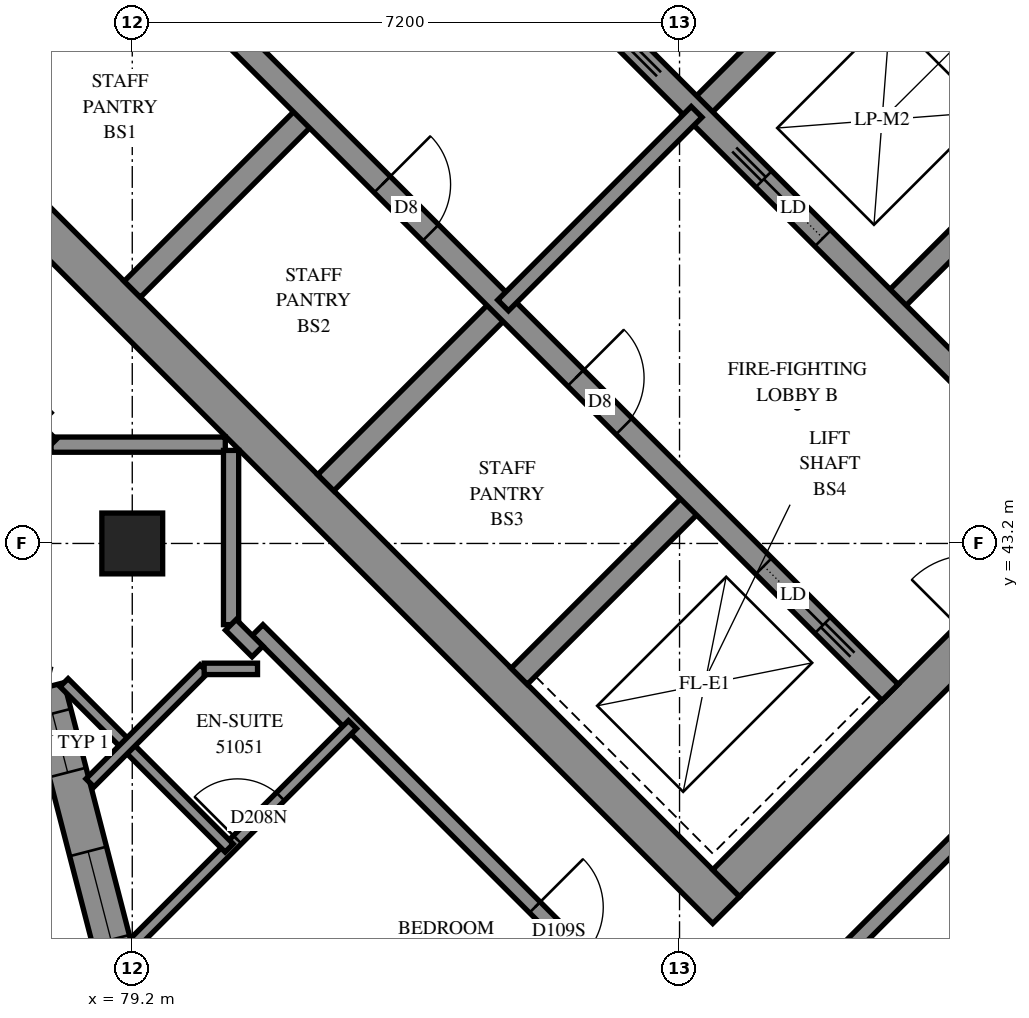
"""IFC4 building model, lengths in metres.
Left out: names, types, materials, properties, quantities, classifications, styles, units other than length and angle.
Written with IfcOpenShell. Run it as: python <this file> out.ifc"""

import sys

from ifc_helpers import new_model, si_unit, direction, frame, frame_2d, origin, origin_2d, place, context, subcontext, project, spatial, polyline, rectangle, outline, extrude, element, fill, save


model = new_model("IFC4")
c1 = context("Model", 3, precision=1e-05, world=origin(), true_north=direction((0.0, 1.0)))
c2 = subcontext(c1, "Body", "Model", "MODEL_VIEW")
j1 = project(units=[si_unit("LENGTHUNIT", "METRE"), si_unit("PLANEANGLEUNIT", "RADIAN")], contexts=[c1])
p1 = place(None, origin())
s1 = spatial("IfcSite", under=j1, at=p1, CompositionType="ELEMENT")
p2 = place(p1, origin())
s2 = spatial("IfcBuilding", under=s1, at=p2, CompositionType="ELEMENT")
p3 = place(p2, frame((0.0, 0.0, 189.6)))
s3 = spatial("IfcBuildingStorey", under=s2, at=p3, CompositionType="ELEMENT", Elevation=189.6)
p4 = place(p3, frame((79.2, 43.2, 0.0), z_axis=(0.0, 0.0, 1.0), x_axis=(1.0, 0.0, 0.0)))
e1 = element("IfcColumn", 1, at=p4, inside=s3, PredefinedType="COLUMN", context=c2, shape_type="SweptSolid", body=[
    extrude(rectangle(XDim=0.8, YDim=0.8, at=origin_2d()), origin(), (0.0, 0.0, 1.0), 3.1),
])
p5 = place(p3, frame((76.124, 49.267, -0.3), z_axis=(0.0, 0.0, 1.0), x_axis=(0.7071067812, -0.7071067812, 0.0)))
e2 = element("IfcWall", 2, at=p5, inside=s3, PredefinedType="SHEAR", context=c2, shape_type="SweptSolid", body=[
    extrude(rectangle(XDim=15.4, YDim=0.5, at=frame_2d((7.7, 0.0))), origin(), (0.0, 0.0, 1.0), 2.7),
])
p6 = place(p3, frame((86.66, 59.802, -0.3), z_axis=(0.0, 0.0, 1.0), x_axis=(0.7071067812, -0.7071067812, 0.0)))
e3 = element("IfcWall", 3, at=p6, inside=s3, PredefinedType="SHEAR", context=c2, shape_type="SweptSolid", body=[
    extrude(rectangle(XDim=15.4, YDim=0.5, at=frame_2d((7.7, 0.0))), origin(), (0.0, 0.0, 1.0), 2.7),
])
p7 = place(p6, frame((10.5, 0.0, 0.3)))
e4 = element("IfcOpeningElement", 4, at=p7, cuts=e3, PredefinedType="OPENING", context=c2, shape_type="SweptSolid", body=[
    extrude(rectangle(XDim=0.8, YDim=2.1, at=frame_2d((0.4, 1.05))), frame((0.0, 0.26, 0.0), z_axis=(0.0, -1.0, 0.0), x_axis=(1.0, 0.0, 0.0)), (0.0, 0.0, 1.0), 0.52),
])
p8 = place(p3, frame((76.478, 49.267, -0.3), z_axis=(0.0, 0.0, 1.0), x_axis=(0.7071067812, 0.7071067812, 0.0)))
e5 = element("IfcWall", 5, at=p8, inside=s3, PredefinedType="SHEAR", context=c2, shape_type="SweptSolid", body=[
    extrude(rectangle(XDim=14.4, YDim=0.5, at=frame_2d((7.2, 0.0))), origin(), (0.0, 0.0, 1.0), 2.7),
])
p9 = place(p8, frame((4.55, 0.0, 0.3)))
e6 = element("IfcOpeningElement", 6, at=p9, cuts=e5, PredefinedType="OPENING", context=c2, shape_type="SweptSolid", body=[
    extrude(rectangle(XDim=1.1, YDim=2.1, at=frame_2d((0.55, 1.05))), frame((0.0, 0.26, 0.0), z_axis=(0.0, -1.0, 0.0), x_axis=(1.0, 0.0, 0.0)), (0.0, 0.0, 1.0), 0.52),
])
p10 = place(p8, frame((11.35, 0.0, 0.3)))
e7 = element("IfcOpeningElement", 7, at=p10, cuts=e5, PredefinedType="OPENING", context=c2, shape_type="SweptSolid", body=[
    extrude(rectangle(XDim=1.1, YDim=2.1, at=frame_2d((0.55, 1.05))), frame((0.0, 0.26, 0.0), z_axis=(0.0, -1.0, 0.0), x_axis=(1.0, 0.0, 0.0)), (0.0, 0.0, 1.0), 0.52),
])
p11 = place(p3, frame((87.013, 38.731, -0.3), z_axis=(0.0, 0.0, 1.0), x_axis=(0.7071067812, 0.7071067812, 0.0)))
e8 = element("IfcWall", 8, at=p11, inside=s3, PredefinedType="SHEAR", context=c2, shape_type="SweptSolid", body=[
    extrude(rectangle(XDim=14.4, YDim=0.5, at=frame_2d((7.2, 0.0))), origin(), (0.0, 0.0, 1.0), 2.7),
])
p12 = place(p11, frame((4.55, 0.0, 0.3)))
e9 = element("IfcOpeningElement", 9, at=p12, cuts=e8, PredefinedType="OPENING", context=c2, shape_type="SweptSolid", body=[
    extrude(rectangle(XDim=1.1, YDim=2.1, at=frame_2d((0.55, 1.05))), frame((0.0, 0.26, 0.0), z_axis=(0.0, -1.0, 0.0), x_axis=(1.0, 0.0, 0.0)), (0.0, 0.0, 1.0), 0.52),
])
p13 = place(p11, frame((11.35, 0.0, 0.3)))
e10 = element("IfcOpeningElement", 10, at=p13, cuts=e8, PredefinedType="OPENING", context=c2, shape_type="SweptSolid", body=[
    extrude(rectangle(XDim=1.1, YDim=2.1, at=frame_2d((0.55, 1.05))), frame((0.0, 0.26, 0.0), z_axis=(0.0, -1.0, 0.0), x_axis=(1.0, 0.0, 0.0)), (0.0, 0.0, 1.0), 0.52),
])
p14 = place(p3, frame((79.2, 46.544, 0.0), z_axis=(0.0, 0.0, 1.0), x_axis=(0.7071219326, 0.7070916295, 0.0)))
e11 = element("IfcWall", 11, at=p14, inside=s3, PredefinedType="SOLIDWALL", context=c2, shape_type="SweptSolid", body=[
    extrude(rectangle(XDim=3.3, YDim=0.3, at=frame_2d((1.65, 0.0))), origin(), (0.0, 0.0, 1.0), 3.1),
])
p15 = place(p3, frame((81.746, 43.999, 0.0), z_axis=(0.0, 0.0, 1.0), x_axis=(0.7071067812, 0.7071067812, 0.0)))
e12 = element("IfcWall", 12, at=p15, inside=s3, PredefinedType="SOLIDWALL", context=c2, shape_type="SweptSolid", body=[
    extrude(rectangle(XDim=3.3, YDim=0.3, at=frame_2d((1.65, 0.0))), origin(), (0.0, 0.0, 1.0), 3.1),
])
p16 = place(p3, frame((86.625, 48.878, 0.0), z_axis=(0.0, 0.0, 1.0), x_axis=(0.7071067812, 0.7071067812, 0.0)))
e13 = element("IfcWall", 13, at=p16, inside=s3, PredefinedType="SOLIDWALL", context=c2, shape_type="SweptSolid", body=[
    extrude(rectangle(XDim=3.3, YDim=0.3, at=frame_2d((1.65, 0.0))), origin(), (0.0, 0.0, 1.0), 3.1),
])
p17 = place(p3, frame((84.291, 41.453, 0.0), z_axis=(0.0, 0.0, 1.0), x_axis=(0.7071067812, 0.7071067812, 0.0)))
e14 = element("IfcWall", 14, at=p17, inside=s3, PredefinedType="SOLIDWALL", context=c2, shape_type="SweptSolid", body=[
    extrude(rectangle(XDim=3.3, YDim=0.3, at=frame_2d((1.65, 0.0))), origin(), (0.0, 0.0, 1.0), 3.1),
])
p18 = place(p3, frame((89.17, 46.332, 0.0), z_axis=(0.0, 0.0, 1.0), x_axis=(0.7071067812, 0.7071067812, 0.0)))
e15 = element("IfcWall", 15, at=p18, inside=s3, PredefinedType="SOLIDWALL", context=c2, shape_type="SweptSolid", body=[
    extrude(rectangle(XDim=3.3, YDim=0.3, at=frame_2d((1.65, 0.0))), origin(), (0.0, 0.0, 1.0), 3.1),
])
p19 = place(p3, frame((78.988, 51.423, 0.0), z_axis=(0.0, 0.0, 1.0), x_axis=(0.7071067812, -0.7071067812, 0.0)))
e16 = element("IfcWall", 16, at=p19, inside=s3, PredefinedType="SOLIDWALL", context=c2, shape_type="SweptSolid", body=[
    extrude(rectangle(XDim=14.4, YDim=0.3, at=frame_2d((7.2, 0.0))), origin(), (0.0, 0.0, 1.0), 3.1),
])
p20 = place(p19, frame((1.35, 0.0, 0.0)))
e17 = element("IfcOpeningElement", 17, at=p20, cuts=e16, PredefinedType="OPENING", context=c2, shape_type="SweptSolid", body=[
    extrude(rectangle(XDim=0.9, YDim=2.1, at=frame_2d((0.45, 1.05))), frame((0.0, 0.16, 0.0), z_axis=(0.0, -1.0, 0.0), x_axis=(1.0, 0.0, 0.0)), (0.0, 0.0, 1.0), 0.32),
])
p21 = place(p19, frame((4.95, 0.0, 0.0)))
e18 = element("IfcOpeningElement", 18, at=p21, cuts=e16, PredefinedType="OPENING", context=c2, shape_type="SweptSolid", body=[
    extrude(rectangle(XDim=0.9, YDim=2.1, at=frame_2d((0.45, 1.05))), frame((0.0, 0.16, 0.0), z_axis=(0.0, -1.0, 0.0), x_axis=(1.0, 0.0, 0.0)), (0.0, 0.0, 1.0), 0.32),
])
p22 = place(p19, frame((8.55, 0.0, 0.0)))
e19 = element("IfcOpeningElement", 19, at=p22, cuts=e16, PredefinedType="OPENING", context=c2, shape_type="SweptSolid", body=[
    extrude(rectangle(XDim=0.9, YDim=2.1, at=frame_2d((0.45, 1.05))), frame((0.0, 0.16, 0.0), z_axis=(0.0, -1.0, 0.0), x_axis=(1.0, 0.0, 0.0)), (0.0, 0.0, 1.0), 0.32),
])
p23 = place(p19, frame((12.05, 0.0, 0.0)))
e20 = element("IfcOpeningElement", 20, at=p23, cuts=e16, PredefinedType="OPENING", context=c2, shape_type="SweptSolid", body=[
    extrude(rectangle(XDim=1.1, YDim=2.1, at=frame_2d((0.55, 1.05))), frame((0.0, 0.16, 0.0), z_axis=(0.0, -1.0, 0.0), x_axis=(1.0, 0.0, 0.0)), (0.0, 0.0, 1.0), 0.32),
])
p24 = place(p3, frame((81.534, 53.969, 0.0), z_axis=(0.0, 0.0, 1.0), x_axis=(0.707103309, -0.7071102534, 0.0)))
e21 = element("IfcWall", 21, at=p24, inside=s3, PredefinedType="SOLIDWALL", context=c2, shape_type="SweptSolid", body=[
    extrude(rectangle(XDim=14.4, YDim=0.3, at=frame_2d((7.2, 0.0))), origin(), (0.0, 0.0, 1.0), 3.1),
])
p25 = place(p24, frame((1.25, 0.0, 0.0)))
e22 = element("IfcOpeningElement", 22, at=p25, cuts=e21, PredefinedType="OPENING", context=c2, shape_type="SweptSolid", body=[
    extrude(rectangle(XDim=1.1, YDim=2.1, at=frame_2d((0.55, 1.05))), frame((0.0, 0.16, 0.0), z_axis=(0.0, -1.0, 0.0), x_axis=(1.0, 0.0, 0.0)), (0.0, 0.0, 1.0), 0.32),
])
p26 = place(p24, frame((4.85, 0.0, 0.0)))
e23 = element("IfcOpeningElement", 23, at=p26, cuts=e21, PredefinedType="OPENING", context=c2, shape_type="SweptSolid", body=[
    extrude(rectangle(XDim=1.1, YDim=2.1, at=frame_2d((0.55, 1.05))), frame((0.0, 0.16, 0.0), z_axis=(0.0, -1.0, 0.0), x_axis=(1.0, 0.0, 0.0)), (0.0, 0.0, 1.0), 0.32),
])
p27 = place(p24, frame((8.45, 0.0, 0.0)))
e24 = element("IfcOpeningElement", 24, at=p27, cuts=e21, PredefinedType="OPENING", context=c2, shape_type="SweptSolid", body=[
    extrude(rectangle(XDim=1.1, YDim=2.1, at=frame_2d((0.55, 1.05))), frame((0.0, 0.16, 0.0), z_axis=(0.0, -1.0, 0.0), x_axis=(1.0, 0.0, 0.0)), (0.0, 0.0, 1.0), 0.32),
])
p28 = place(p24, frame((12.05, 0.0, 0.0)))
e25 = element("IfcOpeningElement", 25, at=p28, cuts=e21, PredefinedType="OPENING", context=c2, shape_type="SweptSolid", body=[
    extrude(rectangle(XDim=1.1, YDim=2.1, at=frame_2d((0.55, 1.05))), frame((0.0, 0.16, 0.0), z_axis=(0.0, -1.0, 0.0), x_axis=(1.0, 0.0, 0.0)), (0.0, 0.0, 1.0), 0.32),
])
p29 = place(p3, frame((88.958, 51.211, 0.0), z_axis=(0.0, 0.0, 1.0), x_axis=(0.7070998367, -0.7071137256, 0.0)))
e26 = element("IfcWall", 26, at=p29, inside=s3, PredefinedType="SOLIDWALL", context=c2, shape_type="SweptSolid", body=[
    extrude(rectangle(XDim=7.2, YDim=0.3, at=frame_2d((3.6, 0.0))), origin(), (0.0, 0.0, 1.0), 3.1),
])
p30 = place(p3, frame((74.294, 42.253, 0.0), z_axis=(0.0, 0.0, 1.0), x_axis=(0.969855535, -0.243680613, 0.0)))
e27 = element("IfcWall", 27, at=p30, inside=s3, PredefinedType="SOLIDWALL", context=c2, shape_type="SweptSolid", body=[
    extrude(outline(polyline([(0.042, -0.25), (3.735, -0.25), (4.032, 0.25), (-0.042, 0.25), (0.042, -0.25)])), origin(), (0.0, 0.0, 1.0), 3.1),
])
p31 = place(p30, frame((1.915, 0.0, 0.45)))
e28 = element("IfcOpeningElement", 28, at=p31, cuts=e27, PredefinedType="OPENING", context=c2, shape_type="SweptSolid", body=[
    extrude(rectangle(XDim=1.2, YDim=2.5, at=frame_2d((0.6, 1.25))), frame((0.0, 0.26, 0.0), z_axis=(0.0, -1.0, 0.0), x_axis=(1.0, 0.0, 0.0)), (0.0, 0.0, 1.0), 0.52),
])
p32 = place(p3, frame((78.061, 41.306, 0.0), z_axis=(0.0, 0.0, 1.0), x_axis=(0.2504653843, -0.9681255555, 0.0)))
e29 = element("IfcWall", 29, at=p32, inside=s3, PredefinedType="SOLIDWALL", context=c2, shape_type="SweptSolid", body=[
    extrude(outline(polyline([(0.148, -0.25), (4.878, -0.25), (4.596, 0.25), (-0.148, 0.25), (0.148, -0.25)])), origin(), (0.0, 0.0, 1.0), 3.1),
])
p33 = place(p32, frame((2.229, 0.0, 0.45)))
e30 = element("IfcOpeningElement", 30, at=p33, cuts=e29, PredefinedType="OPENING", context=c2, shape_type="SweptSolid", body=[
    extrude(rectangle(XDim=1.2, YDim=2.5, at=frame_2d((0.6, 1.25))), frame((0.0, 0.26, 0.0), z_axis=(0.0, -1.0, 0.0), x_axis=(1.0, 0.0, 0.0)), (0.0, 0.0, 1.0), 0.52),
])
p34 = place(p32, frame((0.356, 0.0, 0.45)))
e31 = element("IfcOpeningElement", 31, at=p34, cuts=e29, PredefinedType="OPENING", context=c2, shape_type="SweptSolid", body=[
    extrude(rectangle(XDim=0.8, YDim=2.5, at=frame_2d((0.4, 1.25))), frame((0.0, 0.26, 0.0), z_axis=(0.0, -1.0, 0.0), x_axis=(1.0, 0.0, 0.0)), (0.0, 0.0, 1.0), 0.52),
])
p35 = place(p3, frame((84.079, 46.332, 0.0), z_axis=(0.0, 0.0, 1.0), x_axis=(0.7071067812, 0.7071067812, 0.0)))
e32 = element("IfcWall", 32, at=p35, inside=s3, PredefinedType="PARTITIONING", context=c2, shape_type="SweptSolid", body=[
    extrude(rectangle(XDim=3.6, YDim=0.2, at=frame_2d((1.8, 0.0))), origin(), (0.0, 0.0, 1.0), 3.1),
])
p36 = place(p3, frame((84.971, 31.945, 0.0), z_axis=(0.0, 0.0, 1.0), x_axis=(0.7072312442, 0.7069822963, 0.0)))
e33 = element("IfcWall", 33, at=p36, inside=s3, PredefinedType="PARTITIONING", context=c2, shape_type="SweptSolid", body=[
    extrude(rectangle(XDim=10.042, YDim=0.2, at=frame_2d((5.021, 0.0))), origin(), (0.0, 0.0, 1.0), 3.1),
])
p37 = place(p3, frame((86.835, 36.079, 0.0), z_axis=(0.0, 0.0, 1.0), x_axis=(0.7071067812, 0.7071067812, 0.0)))
e34 = element("IfcWall", 34, at=p37, inside=s3, PredefinedType="PARTITIONING", context=c2, shape_type="SweptSolid", body=[
    extrude(rectangle(XDim=8.2, YDim=0.2, at=frame_2d((4.1, 0.0))), origin(), (0.0, 0.0, 1.0), 3.1),
])
p38 = place(p3, frame((80.849, 42.061, 0.0), z_axis=(0.0, 0.0, 1.0), x_axis=(0.7071067812, -0.7071067812, 0.0)))
e35 = element("IfcWall", 35, at=p38, inside=s3, PredefinedType="PARTITIONING", context=c2, shape_type="SweptSolid", body=[
    extrude(rectangle(XDim=6.964, YDim=0.2, at=frame_2d((3.482, 0.0))), origin(), (0.0, 0.0, 1.0), 3.1),
])
p39 = place(p38, frame((5.159, 0.0, 0.0)))
e36 = element("IfcOpeningElement", 36, at=p39, cuts=e35, PredefinedType="OPENING", context=c2, shape_type="SweptSolid", body=[
    extrude(rectangle(XDim=0.9, YDim=2.1, at=frame_2d((0.45, 1.05))), frame((0.0, 0.11, 0.0), z_axis=(0.0, -1.0, 0.0), x_axis=(1.0, 0.0, 0.0)), (0.0, 0.0, 1.0), 0.22),
])
p40 = place(p3, frame((79.196, 37.915, 0.0), z_axis=(0.0, 0.0, 1.0), x_axis=(0.7070945944, 0.7071189677, 0.0)))
e37 = element("IfcWall", 37, at=p40, inside=s3, PredefinedType="PARTITIONING", context=c2, shape_type="SweptSolid", body=[
    extrude(rectangle(XDim=4.103, YDim=0.15, at=frame_2d((2.051, 0.0))), origin(), (0.0, 0.0, 1.0), 3.1),
])
p41 = place(p40, frame((1.962, 0.0, 0.0)))
e38 = element("IfcOpeningElement", 38, at=p41, cuts=e37, PredefinedType="OPENING", context=c2, shape_type="SweptSolid", body=[
    extrude(rectangle(XDim=0.8, YDim=2.1, at=frame_2d((0.4, 1.05))), frame((0.0, 0.085, 0.0), z_axis=(0.0, -1.0, 0.0), x_axis=(1.0, 0.0, 0.0)), (0.0, 0.0, 1.0), 0.17),
])
p42 = place(p3, frame((78.303, 41.369, 0.0), z_axis=(0.0, 0.0, 1.0), x_axis=(0.706602443, -0.7076107599, 0.0)))
e39 = element("IfcWall", 39, at=p42, inside=s3, PredefinedType="PARTITIONING", context=c2, shape_type="SweptSolid", body=[
    extrude(rectangle(XDim=3.074, YDim=0.15, at=frame_2d((1.537, 0.0))), origin(), (0.0, 0.0, 1.0), 3.1),
])
for number, where, z_axis, x_axis in (
    (40, (78.132, 44.5, 0.0), (0.0, 0.0, 1.0), (1.0, 0.0, 0.0)),
    (41, (80.5, 42.132, 0.0), (0.0, 0.0, 1.0), (0.0, 1.0, 0.0)),
):
    element("IfcWall", number, at=place(p3, frame(where, z_axis=z_axis, x_axis=x_axis)), inside=s3, PredefinedType="PARTITIONING", context=c2, shape_type="SweptSolid", body=[
        extrude(rectangle(XDim=2.292, YDim=0.2, at=frame_2d((1.146, 0.0))), origin(), (0.0, 0.0, 1.0), 3.1),
    ])
p43 = place(p3, frame((78.644, 40.05, 0.0), z_axis=(0.0, 0.0, 1.0), x_axis=(0.7070832255, 0.7071303361, 0.0)))
e42 = element("IfcWall", 42, at=p43, inside=s3, PredefinedType="PARTITIONING", context=c2, shape_type="SweptSolid", body=[
    extrude(rectangle(XDim=2.123, YDim=0.15, at=frame_2d((1.061, 0.0))), origin(), (0.0, 0.0, 1.0), 3.1),
])
p44 = place(p3, frame((80.146, 41.55, 0.0), z_axis=(0.0, 0.0, 1.0), x_axis=(1.0, 0.0, 0.0)))
e43 = element("IfcWall", 43, at=p44, inside=s3, PredefinedType="PARTITIONING", context=c2, shape_type="SweptSolid", body=[
    extrude(rectangle(XDim=0.702, YDim=0.15, at=frame_2d((0.351, 0.0))), origin(), (0.0, 0.0, 1.0), 3.1),
])
for number, where, z_axis, x_axis in (
    (44, (77.779, 44.847, 0.0), (0.0, 0.0, 1.0), (0.707, -0.707, 0.0)),
    (45, (80.497, 42.129, 0.0), (0.0, 0.0, 1.0), (0.707, -0.707, 0.0)),
):
    element("IfcWall", number, at=place(p3, frame(where, z_axis=z_axis, x_axis=x_axis)), inside=s3, PredefinedType="PARTITIONING", context=c2, shape_type="SweptSolid", body=[
        extrude(rectangle(XDim=0.495, YDim=0.2, at=frame_2d((0.247, 0.0))), origin(), (0.0, 0.0, 1.0), 3.1),
    ])
p45 = place(p33, origin())
e46 = element("IfcWindow", 46, at=p45, inside=s3, PartitioningType="SINGLE_PANEL", PredefinedType="WINDOW", context=c2, shape_type="SweptSolid", body=[
    extrude(rectangle(XDim=1.2, YDim=2.5, at=frame_2d((0.6, 1.25))), frame((0.0, 0.18, 0.0), z_axis=(0.0, -1.0, 0.0), x_axis=(1.0, 0.0, 0.0)), (0.0, 0.0, 1.0), 0.06),
])
fill(e30, e46)
p46 = place(p21, origin())
e47 = element("IfcDoor", 47, at=p46, inside=s3, OperationType="SINGLE_SWING_LEFT", PredefinedType="DOOR", context=c2, shape_type="SweptSolid", body=[
    extrude(rectangle(XDim=0.9, YDim=2.1, at=frame_2d((0.45, 1.05))), frame((0.0, 0.025, 0.0), z_axis=(0.0, -1.0, 0.0), x_axis=(1.0, 0.0, 0.0)), (0.0, 0.0, 1.0), 0.05),
])
fill(e18, e47)
p47 = place(p22, origin())
e48 = element("IfcDoor", 48, at=p47, inside=s3, OperationType="SINGLE_SWING_LEFT", PredefinedType="DOOR", context=c2, shape_type="SweptSolid", body=[
    extrude(rectangle(XDim=0.9, YDim=2.1, at=frame_2d((0.45, 1.05))), frame((0.0, 0.025, 0.0), z_axis=(0.0, -1.0, 0.0), x_axis=(1.0, 0.0, 0.0)), (0.0, 0.0, 1.0), 0.05),
])
fill(e19, e48)
p48 = place(p23, origin())
e49 = element("IfcDoor", 49, at=p48, inside=s3, OperationType="SLIDING_TO_RIGHT", PredefinedType="DOOR", context=c2, shape_type="SweptSolid", body=[
    extrude(rectangle(XDim=1.1, YDim=2.1, at=frame_2d((0.55, 1.05))), frame((0.0, 0.025, 0.0), z_axis=(0.0, -1.0, 0.0), x_axis=(1.0, 0.0, 0.0)), (0.0, 0.0, 1.0), 0.05),
])
fill(e20, e49)
p49 = place(p27, origin())
e50 = element("IfcDoor", 50, at=p49, inside=s3, OperationType="SLIDING_TO_LEFT", PredefinedType="DOOR", context=c2, shape_type="SweptSolid", body=[
    extrude(rectangle(XDim=1.1, YDim=2.1, at=frame_2d((0.55, 1.05))), frame((0.0, 0.025, 0.0), z_axis=(0.0, -1.0, 0.0), x_axis=(1.0, 0.0, 0.0)), (0.0, 0.0, 1.0), 0.05),
])
fill(e24, e50)
p50 = place(p39, origin())
e51 = element("IfcDoor", 51, at=p50, inside=s3, OperationType="SINGLE_SWING_RIGHT", PredefinedType="DOOR", context=c2, shape_type="SweptSolid", body=[
    extrude(rectangle(XDim=0.9, YDim=2.1, at=frame_2d((0.45, 1.05))), frame((0.0, 0.025, 0.0), z_axis=(0.0, -1.0, 0.0), x_axis=(1.0, 0.0, 0.0)), (0.0, 0.0, 1.0), 0.05),
])
fill(e36, e51)
p51 = place(p41, origin())
e52 = element("IfcDoor", 52, at=p51, inside=s3, OperationType="SINGLE_SWING_RIGHT", PredefinedType="DOOR", context=c2, shape_type="SweptSolid", body=[
    extrude(rectangle(XDim=0.8, YDim=2.1, at=frame_2d((0.4, 1.05))), frame((0.0, 0.025, 0.0), z_axis=(0.0, -1.0, 0.0), x_axis=(1.0, 0.0, 0.0)), (0.0, 0.0, 1.0), 0.05),
])
fill(e38, e52)
p52 = place(p34, origin())
e53 = element("IfcWindow", 53, at=p52, inside=s3, PartitioningType="SINGLE_PANEL", PredefinedType="WINDOW", context=c2, shape_type="SweptSolid", body=[
    extrude(rectangle(XDim=0.8, YDim=2.5, at=frame_2d((0.4, 1.25))), frame((0.0, 0.18, 0.0), z_axis=(0.0, -1.0, 0.0), x_axis=(1.0, 0.0, 0.0)), (0.0, 0.0, 1.0), 0.06),
])
fill(e31, e53)
save(model, sys.argv[1])
